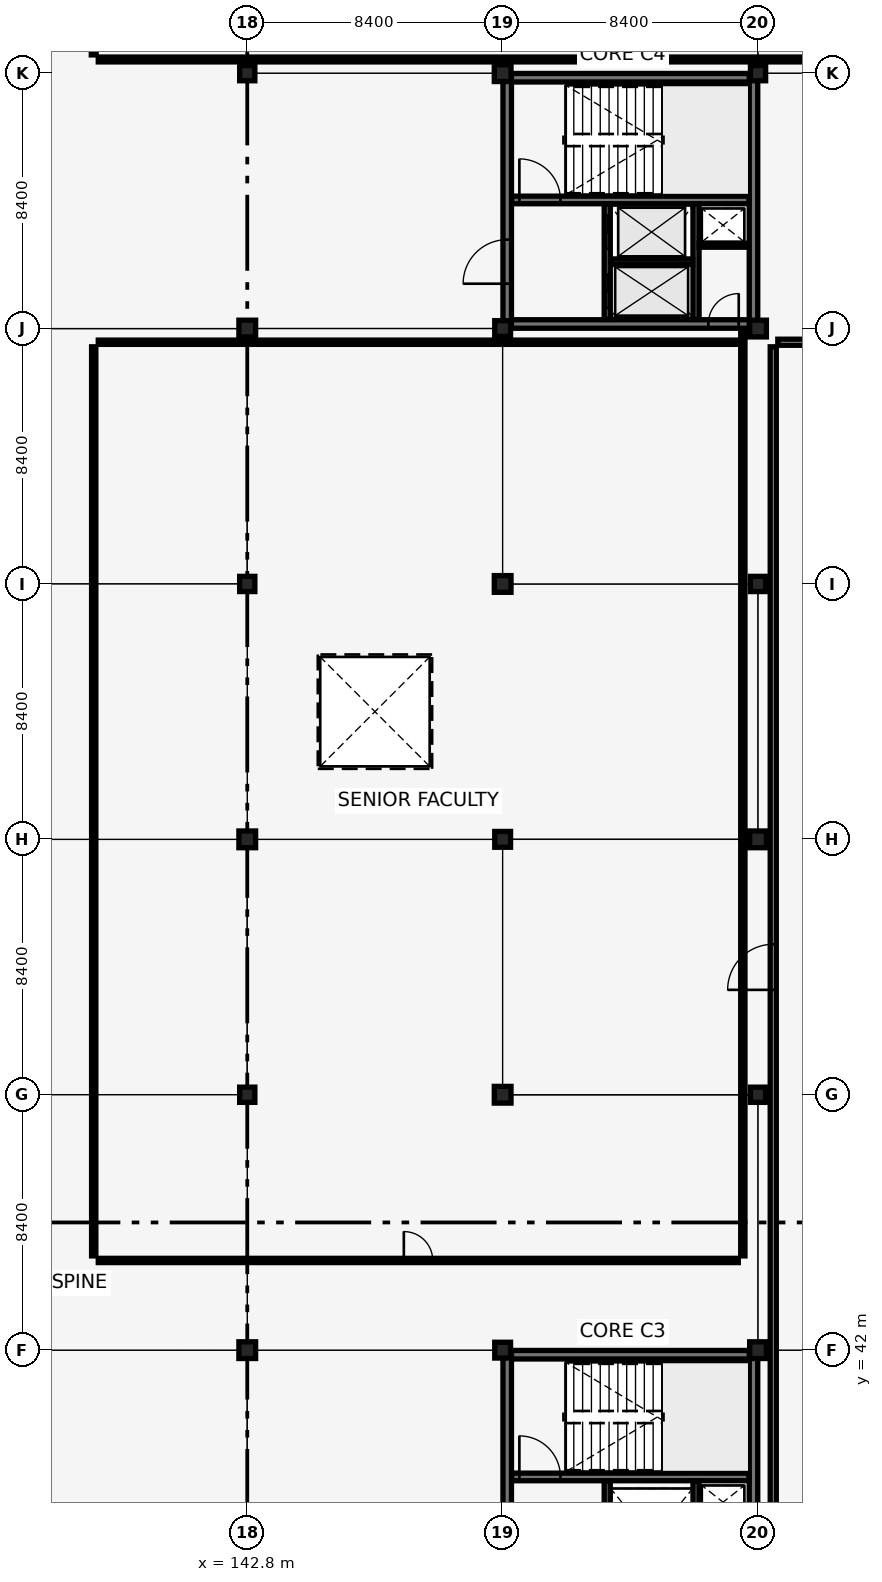
"""IFC4 building model, lengths in metres.
Left out: names, types, materials, properties, quantities, classifications, styles, units other than length and angle.
Written with IfcOpenShell. Run it as: python <this file> out.ifc"""

import sys

from ifc_helpers import new_model, si_unit, direction, frame, frame_2d, origin, origin_2d, place, context, subcontext, project, spatial, rectangle, extrude, element, fill, save


model = new_model("IFC4")
c1 = context("Model", 3, precision=1e-05, world=origin(), true_north=direction((0.0, 1.0)))
c2 = subcontext(c1, "Body", "Model", "MODEL_VIEW")
j1 = project(units=[si_unit("LENGTHUNIT", "METRE"), si_unit("PLANEANGLEUNIT", "RADIAN")], contexts=[c1])
p1 = place(None, origin())
s1 = spatial("IfcSite", under=j1, at=p1, CompositionType="ELEMENT")
p2 = place(p1, origin())
s2 = spatial("IfcBuilding", under=s1, at=p2, CompositionType="ELEMENT")
p3 = place(p2, frame((0.0, 0.0, 22.1)))
s3 = spatial("IfcBuildingStorey", under=s2, at=p3, CompositionType="ELEMENT", Elevation=22.1)
p4 = place(p3, frame((151.35, 41.85, 0.0), z_axis=(0.0, 0.0, 1.0), x_axis=(1.0, 0.0, 0.0)))
e1 = element("IfcWall", 1, at=p4, inside=s3, PredefinedType="SHEAR", context=c2, shape_type="SweptSolid", body=[
    extrude(rectangle(XDim=8.1, YDim=0.28, at=frame_2d((4.05, 0.0))), origin(), (0.0, 0.0, 1.0), 3.78),
])
p5 = place(p3, frame((151.35, 33.75, 0.0), z_axis=(0.0, 0.0, 1.0), x_axis=(0.0, 1.0, 0.0)))
e2 = element("IfcWall", 2, at=p5, inside=s3, PredefinedType="SHEAR", context=c2, shape_type="SweptSolid", body=[
    extrude(rectangle(XDim=8.1, YDim=0.28, at=frame_2d((4.05, 0.0))), origin(), (0.0, 0.0, 1.0), 3.78),
])
p6 = place(p5, frame((1.325, 0.0, 0.0)))
e3 = element("IfcOpeningElement", 3, at=p6, cuts=e2, PredefinedType="OPENING", context=c2, shape_type="SweptSolid", body=[
    extrude(rectangle(XDim=1.45, YDim=2.15, at=frame_2d((0.725, 1.075))), frame((0.0, 0.15, 0.0), z_axis=(0.0, -1.0, 0.0), x_axis=(1.0, 0.0, 0.0)), (0.0, 0.0, 1.0), 0.3),
])
p7 = place(p3, frame((159.45, 33.75, 0.0), z_axis=(0.0, 0.0, 1.0), x_axis=(0.0, 1.0, 0.0)))
e4 = element("IfcWall", 4, at=p7, inside=s3, PredefinedType="SHEAR", context=c2, shape_type="SweptSolid", body=[
    extrude(rectangle(XDim=8.1, YDim=0.28, at=frame_2d((4.05, 0.0))), origin(), (0.0, 0.0, 1.0), 3.78),
])
p8 = place(p3, frame((151.5, 37.83, 0.0), z_axis=(0.0, 0.0, 1.0), x_axis=(1.0, 0.0, 0.0)))
e5 = element("IfcWall", 5, at=p8, inside=s3, PredefinedType="SHEAR", context=c2, shape_type="SweptSolid", body=[
    extrude(rectangle(XDim=7.8, YDim=0.25, at=frame_2d((3.9, 0.0))), origin(), (0.0, 0.0, 1.0), 3.78),
])
p9 = place(p8, frame((0.25, 0.0, 0.0)))
e6 = element("IfcOpeningElement", 6, at=p9, cuts=e5, PredefinedType="OPENING", context=c2, shape_type="SweptSolid", body=[
    extrude(rectangle(XDim=1.35, YDim=2.15, at=frame_2d((0.675, 1.075))), frame((0.0, 0.135, 0.0), z_axis=(0.0, -1.0, 0.0), x_axis=(1.0, 0.0, 0.0)), (0.0, 0.0, 1.0), 0.27),
])
p10 = place(p3, frame((151.35, 75.75, 0.0), z_axis=(0.0, 0.0, 1.0), x_axis=(1.0, 0.0, 0.0)))
e7 = element("IfcWall", 7, at=p10, inside=s3, PredefinedType="SHEAR", context=c2, shape_type="SweptSolid", body=[
    extrude(rectangle(XDim=8.1, YDim=0.28, at=frame_2d((4.05, 0.0))), origin(), (0.0, 0.0, 1.0), 3.78),
])
p11 = place(p10, frame((6.615, 0.0, 0.0)))
e8 = element("IfcOpeningElement", 8, at=p11, cuts=e7, PredefinedType="OPENING", context=c2, shape_type="SweptSolid", body=[
    extrude(rectangle(XDim=1.0, YDim=2.15, at=frame_2d((0.5, 1.075))), frame((0.0, 0.15, 0.0), z_axis=(0.0, -1.0, 0.0), x_axis=(1.0, 0.0, 0.0)), (0.0, 0.0, 1.0), 0.3),
])
p12 = place(p3, frame((151.35, 83.85, 0.0), z_axis=(0.0, 0.0, 1.0), x_axis=(1.0, 0.0, 0.0)))
e9 = element("IfcWall", 9, at=p12, inside=s3, PredefinedType="SHEAR", context=c2, shape_type="SweptSolid", body=[
    extrude(rectangle(XDim=8.1, YDim=0.28, at=frame_2d((4.05, 0.0))), origin(), (0.0, 0.0, 1.0), 3.78),
])
p13 = place(p3, frame((151.35, 75.75, 0.0), z_axis=(0.0, 0.0, 1.0), x_axis=(0.0, 1.0, 0.0)))
e10 = element("IfcWall", 10, at=p13, inside=s3, PredefinedType="SHEAR", context=c2, shape_type="SweptSolid", body=[
    extrude(rectangle(XDim=8.1, YDim=0.28, at=frame_2d((4.05, 0.0))), origin(), (0.0, 0.0, 1.0), 3.78),
])
p14 = place(p13, frame((1.325, 0.0, 0.0)))
e11 = element("IfcOpeningElement", 11, at=p14, cuts=e10, PredefinedType="OPENING", context=c2, shape_type="SweptSolid", body=[
    extrude(rectangle(XDim=1.45, YDim=2.15, at=frame_2d((0.725, 1.075))), frame((0.0, 0.15, 0.0), z_axis=(0.0, -1.0, 0.0), x_axis=(1.0, 0.0, 0.0)), (0.0, 0.0, 1.0), 0.3),
])
p15 = place(p3, frame((159.45, 75.75, 0.0), z_axis=(0.0, 0.0, 1.0), x_axis=(0.0, 1.0, 0.0)))
e12 = element("IfcWall", 12, at=p15, inside=s3, PredefinedType="SHEAR", context=c2, shape_type="SweptSolid", body=[
    extrude(rectangle(XDim=8.1, YDim=0.28, at=frame_2d((4.05, 0.0))), origin(), (0.0, 0.0, 1.0), 3.78),
])
p16 = place(p3, frame((151.5, 79.83, 0.0), z_axis=(0.0, 0.0, 1.0), x_axis=(1.0, 0.0, 0.0)))
e13 = element("IfcWall", 13, at=p16, inside=s3, PredefinedType="SHEAR", context=c2, shape_type="SweptSolid", body=[
    extrude(rectangle(XDim=7.8, YDim=0.25, at=frame_2d((3.9, 0.0))), origin(), (0.0, 0.0, 1.0), 3.78),
])
p17 = place(p16, frame((0.25, 0.0, 0.0)))
e14 = element("IfcOpeningElement", 14, at=p17, cuts=e13, PredefinedType="OPENING", context=c2, shape_type="SweptSolid", body=[
    extrude(rectangle(XDim=1.35, YDim=2.15, at=frame_2d((0.675, 1.075))), frame((0.0, 0.135, 0.0), z_axis=(0.0, -1.0, 0.0), x_axis=(1.0, 0.0, 0.0)), (0.0, 0.0, 1.0), 0.27),
])
p18 = place(p3, frame((142.8, 42.0, 0.0), z_axis=(0.0, 0.0, 1.0), x_axis=(1.0, 0.0, 0.0)))
e15 = element("IfcColumn", 15, at=p18, inside=s3, PredefinedType="COLUMN", context=c2, shape_type="SweptSolid", body=[
    extrude(rectangle(XDim=0.55, YDim=0.55, at=origin_2d()), origin(), (0.0, 0.0, 1.0), 3.78),
])
p19 = place(p3, frame((142.8, 50.4, 0.0), z_axis=(0.0, 0.0, 1.0), x_axis=(1.0, 0.0, 0.0)))
e16 = element("IfcColumn", 16, at=p19, inside=s3, PredefinedType="COLUMN", context=c2, shape_type="SweptSolid", body=[
    extrude(rectangle(XDim=0.5, YDim=0.5, at=origin_2d()), origin(), (0.0, 0.0, 1.0), 3.78),
])
p20 = place(p3, frame((142.8, 58.8, 0.0), z_axis=(0.0, 0.0, 1.0), x_axis=(1.0, 0.0, 0.0)))
e17 = element("IfcColumn", 17, at=p20, inside=s3, PredefinedType="COLUMN", context=c2, shape_type="SweptSolid", body=[
    extrude(rectangle(XDim=0.55, YDim=0.55, at=origin_2d()), origin(), (0.0, 0.0, 1.0), 3.78),
])
p21 = place(p3, frame((142.8, 67.2, 0.0), z_axis=(0.0, 0.0, 1.0), x_axis=(1.0, 0.0, 0.0)))
e18 = element("IfcColumn", 18, at=p21, inside=s3, PredefinedType="COLUMN", context=c2, shape_type="SweptSolid", body=[
    extrude(rectangle(XDim=0.5, YDim=0.5, at=origin_2d()), origin(), (0.0, 0.0, 1.0), 3.78),
])
p22 = place(p3, frame((142.8, 75.6, 0.0), z_axis=(0.0, 0.0, 1.0), x_axis=(1.0, 0.0, 0.0)))
e19 = element("IfcColumn", 19, at=p22, inside=s3, PredefinedType="COLUMN", context=c2, shape_type="SweptSolid", body=[
    extrude(rectangle(XDim=0.55, YDim=0.55, at=origin_2d()), origin(), (0.0, 0.0, 1.0), 3.78),
])
p23 = place(p3, frame((142.8, 84.0, 0.0), z_axis=(0.0, 0.0, 1.0), x_axis=(1.0, 0.0, 0.0)))
e20 = element("IfcColumn", 20, at=p23, inside=s3, PredefinedType="COLUMN", context=c2, shape_type="SweptSolid", body=[
    extrude(rectangle(XDim=0.5, YDim=0.5, at=origin_2d()), origin(), (0.0, 0.0, 1.0), 3.78),
])
p24 = place(p3, frame((151.2, 42.0, 0.0), z_axis=(0.0, 0.0, 1.0), x_axis=(1.0, 0.0, 0.0)))
e21 = element("IfcColumn", 21, at=p24, inside=s3, PredefinedType="COLUMN", context=c2, shape_type="SweptSolid", body=[
    extrude(rectangle(XDim=0.52, YDim=0.52, at=origin_2d()), origin(), (0.0, 0.0, 1.0), 3.78),
])
p25 = place(p3, frame((151.2, 50.4, 0.0), z_axis=(0.0, 0.0, 1.0), x_axis=(1.0, 0.0, 0.0)))
e22 = element("IfcColumn", 22, at=p25, inside=s3, PredefinedType="COLUMN", context=c2, shape_type="SweptSolid", body=[
    extrude(rectangle(XDim=0.55, YDim=0.55, at=origin_2d()), origin(), (0.0, 0.0, 1.0), 3.78),
])
p26 = place(p3, frame((151.2, 58.8, 0.0), z_axis=(0.0, 0.0, 1.0), x_axis=(1.0, 0.0, 0.0)))
e23 = element("IfcColumn", 23, at=p26, inside=s3, PredefinedType="COLUMN", context=c2, shape_type="SweptSolid", body=[
    extrude(rectangle(XDim=0.52, YDim=0.52, at=origin_2d()), origin(), (0.0, 0.0, 1.0), 3.78),
])
p27 = place(p3, frame((151.2, 67.2, 0.0), z_axis=(0.0, 0.0, 1.0), x_axis=(1.0, 0.0, 0.0)))
e24 = element("IfcColumn", 24, at=p27, inside=s3, PredefinedType="COLUMN", context=c2, shape_type="SweptSolid", body=[
    extrude(rectangle(XDim=0.55, YDim=0.55, at=origin_2d()), origin(), (0.0, 0.0, 1.0), 3.78),
])
p28 = place(p3, frame((151.2, 75.6, 0.0), z_axis=(0.0, 0.0, 1.0), x_axis=(1.0, 0.0, 0.0)))
e25 = element("IfcColumn", 25, at=p28, inside=s3, PredefinedType="COLUMN", context=c2, shape_type="SweptSolid", body=[
    extrude(rectangle(XDim=0.52, YDim=0.52, at=origin_2d()), origin(), (0.0, 0.0, 1.0), 3.78),
])
for number, where, z_axis, x_axis in (
    (26, (151.2, 84.0, 0.0), (0.0, 0.0, 1.0), (1.0, 0.0, 0.0)),
    (27, (159.6, 42.0, 0.0), (0.0, 0.0, 1.0), (1.0, 0.0, 0.0)),
):
    element("IfcColumn", number, at=place(p3, frame(where, z_axis=z_axis, x_axis=x_axis)), inside=s3, PredefinedType="COLUMN", context=c2, shape_type="SweptSolid", body=[
        extrude(rectangle(XDim=0.55, YDim=0.55, at=origin_2d()), origin(), (0.0, 0.0, 1.0), 3.78),
    ])
p29 = place(p3, frame((159.6, 50.4, 0.0), z_axis=(0.0, 0.0, 1.0), x_axis=(1.0, 0.0, 0.0)))
e28 = element("IfcColumn", 28, at=p29, inside=s3, PredefinedType="COLUMN", context=c2, shape_type="SweptSolid", body=[
    extrude(rectangle(XDim=0.5, YDim=0.5, at=origin_2d()), origin(), (0.0, 0.0, 1.0), 3.78),
])
p30 = place(p3, frame((159.6, 58.8, 0.0), z_axis=(0.0, 0.0, 1.0), x_axis=(1.0, 0.0, 0.0)))
e29 = element("IfcColumn", 29, at=p30, inside=s3, PredefinedType="COLUMN", context=c2, shape_type="SweptSolid", body=[
    extrude(rectangle(XDim=0.55, YDim=0.55, at=origin_2d()), origin(), (0.0, 0.0, 1.0), 3.78),
])
p31 = place(p3, frame((159.6, 67.2, 0.0), z_axis=(0.0, 0.0, 1.0), x_axis=(1.0, 0.0, 0.0)))
e30 = element("IfcColumn", 30, at=p31, inside=s3, PredefinedType="COLUMN", context=c2, shape_type="SweptSolid", body=[
    extrude(rectangle(XDim=0.5, YDim=0.5, at=origin_2d()), origin(), (0.0, 0.0, 1.0), 3.78),
])
p32 = place(p3, frame((159.6, 75.6, 0.0), z_axis=(0.0, 0.0, 1.0), x_axis=(1.0, 0.0, 0.0)))
e31 = element("IfcColumn", 31, at=p32, inside=s3, PredefinedType="COLUMN", context=c2, shape_type="SweptSolid", body=[
    extrude(rectangle(XDim=0.55, YDim=0.55, at=origin_2d()), origin(), (0.0, 0.0, 1.0), 3.78),
])
p33 = place(p3, frame((159.6, 84.0, 0.0), z_axis=(0.0, 0.0, 1.0), x_axis=(1.0, 0.0, 0.0)))
e32 = element("IfcColumn", 32, at=p33, inside=s3, PredefinedType="COLUMN", context=c2, shape_type="SweptSolid", body=[
    extrude(rectangle(XDim=0.5, YDim=0.5, at=origin_2d()), origin(), (0.0, 0.0, 1.0), 3.78),
])
p34 = place(p3, frame((154.64, 33.9, 0.0), z_axis=(0.0, 0.0, 1.0), x_axis=(0.0, 1.0, 0.0)))
e33 = element("IfcWall", 33, at=p34, inside=s3, PredefinedType="SHEAR", context=c2, shape_type="SweptSolid", body=[
    extrude(rectangle(XDim=3.8, YDim=0.2, at=frame_2d((1.9, 0.0))), origin(), (0.0, 0.0, 1.0), 3.08),
])
p35 = place(p34, frame((1.35, 0.0, 0.0)))
e34 = element("IfcOpeningElement", 34, at=p35, cuts=e33, PredefinedType="OPENING", context=c2, shape_type="SweptSolid", body=[
    extrude(rectangle(XDim=1.1, YDim=2.15, at=frame_2d((0.55, 1.075))), frame((0.0, 0.11, 0.0), z_axis=(0.0, -1.0, 0.0), x_axis=(1.0, 0.0, 0.0)), (0.0, 0.0, 1.0), 0.22),
])
p36 = place(p3, frame((157.56, 33.9, 0.0), z_axis=(0.0, 0.0, 1.0), x_axis=(0.0, 1.0, 0.0)))
e35 = element("IfcWall", 35, at=p36, inside=s3, PredefinedType="SHEAR", context=c2, shape_type="SweptSolid", body=[
    extrude(rectangle(XDim=3.8, YDim=0.2, at=frame_2d((1.9, 0.0))), origin(), (0.0, 0.0, 1.0), 3.08),
])
p37 = place(p3, frame((154.64, 75.9, 0.0), z_axis=(0.0, 0.0, 1.0), x_axis=(0.0, 1.0, 0.0)))
e36 = element("IfcWall", 36, at=p37, inside=s3, PredefinedType="SHEAR", context=c2, shape_type="SweptSolid", body=[
    extrude(rectangle(XDim=3.8, YDim=0.2, at=frame_2d((1.9, 0.0))), origin(), (0.0, 0.0, 1.0), 3.78),
])
p38 = place(p37, frame((0.375, 0.0, 0.0)))
e37 = element("IfcOpeningElement", 37, at=p38, cuts=e36, PredefinedType="OPENING", context=c2, shape_type="SweptSolid", body=[
    extrude(rectangle(XDim=1.1, YDim=2.15, at=frame_2d((0.55, 1.075))), frame((0.0, 0.11, 0.0), z_axis=(0.0, -1.0, 0.0), x_axis=(1.0, 0.0, 0.0)), (0.0, 0.0, 1.0), 0.22),
])
p39 = place(p37, frame((2.325, 0.0, 0.0)))
e38 = element("IfcOpeningElement", 38, at=p39, cuts=e36, PredefinedType="OPENING", context=c2, shape_type="SweptSolid", body=[
    extrude(rectangle(XDim=1.1, YDim=2.15, at=frame_2d((0.55, 1.075))), frame((0.0, 0.11, 0.0), z_axis=(0.0, -1.0, 0.0), x_axis=(1.0, 0.0, 0.0)), (0.0, 0.0, 1.0), 0.22),
])
p40 = place(p3, frame((157.56, 75.9, 0.0), z_axis=(0.0, 0.0, 1.0), x_axis=(0.0, 1.0, 0.0)))
e39 = element("IfcWall", 39, at=p40, inside=s3, PredefinedType="SHEAR", context=c2, shape_type="SweptSolid", body=[
    extrude(rectangle(XDim=3.8, YDim=0.2, at=frame_2d((1.9, 0.0))), origin(), (0.0, 0.0, 1.0), 3.78),
])
p41 = place(p3, frame((154.75, 77.8, 0.0), z_axis=(0.0, 0.0, 1.0), x_axis=(1.0, 0.0, 0.0)))
e40 = element("IfcWall", 40, at=p41, inside=s3, PredefinedType="SHEAR", context=c2, shape_type="SweptSolid", body=[
    extrude(rectangle(XDim=2.7, YDim=0.18, at=frame_2d((1.35, 0.0))), origin(), (0.0, 0.0, 1.0), 3.78),
])
p42 = place(p3, frame((157.66, 78.34, 0.0), z_axis=(0.0, 0.0, 1.0), x_axis=(1.0, 0.0, 0.0)))
e41 = element("IfcWall", 41, at=p42, inside=s3, PredefinedType="PARTITIONING", context=c2, shape_type="SweptSolid", body=[
    extrude(rectangle(XDim=1.62, YDim=0.13, at=frame_2d((0.81, 0.0))), origin(), (0.0, 0.0, 1.0), 3.78),
])
p43 = place(p3, frame((160.1, 34.2, 0.0), z_axis=(0.0, 0.0, 1.0), x_axis=(0.0, 1.0, 0.0)))
e42 = element("IfcWall", 42, at=p43, inside=s3, PredefinedType="PARTITIONING", context=c2, shape_type="SweptSolid", body=[
    extrude(rectangle(XDim=40.8, YDim=0.2, at=frame_2d((20.4, 0.0))), origin(), (0.0, 0.0, 1.0), 3.78),
])
p44 = place(p43, frame((19.65, 0.0, 0.0)))
e43 = element("IfcOpeningElement", 43, at=p44, cuts=e42, PredefinedType="OPENING", context=c2, shape_type="SweptSolid", body=[
    extrude(rectangle(XDim=1.5, YDim=2.2, at=frame_2d((0.75, 1.1))), frame((0.0, 0.11, 0.0), z_axis=(0.0, -1.0, 0.0), x_axis=(1.0, 0.0, 0.0)), (0.0, 0.0, 1.0), 0.22),
])
p45 = place(p3, frame((160.25, 75.15, 0.0), z_axis=(0.0, 0.0, 1.0), x_axis=(1.0, 0.0, 0.0)))
e44 = element("IfcWall", 44, at=p45, inside=s3, PredefinedType="PARTITIONING", context=c2, shape_type="SweptSolid", body=[
    extrude(rectangle(XDim=7.57, YDim=0.2, at=frame_2d((3.785, 0.0))), origin(), (0.0, 0.0, 1.0), 3.78),
])
p46 = place(p3, frame((137.9, 44.95, 0.0), z_axis=(0.0, 0.0, 1.0), x_axis=(1.0, 0.0, 0.0)))
e45 = element("IfcWall", 45, at=p46, inside=s3, PredefinedType="PARTITIONING", context=c2, shape_type="SweptSolid", body=[
    extrude(rectangle(XDim=21.05, YDim=0.14, at=frame_2d((10.525, 0.0))), origin(), (0.0, 0.0, 1.0), 3.13),
])
p47 = place(p46, frame((10.05, 0.0, 0.0)))
e46 = element("IfcOpeningElement", 46, at=p47, cuts=e45, PredefinedType="OPENING", context=c2, shape_type="SweptSolid", body=[
    extrude(rectangle(XDim=0.95, YDim=2.1, at=frame_2d((0.475, 1.05))), frame((0.0, 0.08, 0.0), z_axis=(0.0, -1.0, 0.0), x_axis=(1.0, 0.0, 0.0)), (0.0, 0.0, 1.0), 0.16),
])
p48 = place(p3, frame((137.9, 75.15, 0.0), z_axis=(0.0, 0.0, 1.0), x_axis=(1.0, 0.0, 0.0)))
e47 = element("IfcWall", 47, at=p48, inside=s3, PredefinedType="PARTITIONING", context=c2, shape_type="SweptSolid", body=[
    extrude(rectangle(XDim=21.05, YDim=0.14, at=frame_2d((10.525, 0.0))), origin(), (0.0, 0.0, 1.0), 3.13),
])
p49 = place(p3, frame((137.75, 45.1, 0.0), z_axis=(0.0, 0.0, 1.0), x_axis=(0.0, 1.0, 0.0)))
e48 = element("IfcWall", 48, at=p49, inside=s3, PredefinedType="PARTITIONING", context=c2, shape_type="SweptSolid", body=[
    extrude(rectangle(XDim=29.9, YDim=0.14, at=frame_2d((14.95, 0.0))), origin(), (0.0, 0.0, 1.0), 3.08),
])
p50 = place(p3, frame((159.1, 45.1, 0.0), z_axis=(0.0, 0.0, 1.0), x_axis=(0.0, 1.0, 0.0)))
e49 = element("IfcWall", 49, at=p50, inside=s3, PredefinedType="PARTITIONING", context=c2, shape_type="SweptSolid", body=[
    extrude(rectangle(XDim=30.47, YDim=0.14, at=frame_2d((15.235, 0.0))), origin(), (0.0, 0.0, 1.0), 3.08),
])
p51 = place(p3, frame((137.75, 84.6, 0.0), z_axis=(0.0, 0.0, 1.0), x_axis=(0.0, 1.0, 0.0)))
e50 = element("IfcWall", 50, at=p51, inside=s3, PredefinedType="PARTITIONING", context=c2, shape_type="SweptSolid", body=[
    extrude(rectangle(XDim=16.02, YDim=0.16, at=frame_2d((8.01, 0.0))), origin(), (0.0, 0.0, 1.0), 3.16),
])
p52 = place(p51, frame((7.36, 0.0, 0.0)))
e51 = element("IfcOpeningElement", 51, at=p52, cuts=e50, PredefinedType="OPENING", context=c2, shape_type="SweptSolid", body=[
    extrude(rectangle(XDim=1.3, YDim=2.2, at=frame_2d((0.65, 1.1))), frame((0.0, 0.09, 0.0), z_axis=(0.0, -1.0, 0.0), x_axis=(1.0, 0.0, 0.0)), (0.0, 0.0, 1.0), 0.18),
])
p53 = place(p3, frame((137.9, 84.45, 0.0), z_axis=(0.0, 0.0, 1.0), x_axis=(1.0, 0.0, 0.0)))
e52 = element("IfcWall", 52, at=p53, inside=s3, PredefinedType="PARTITIONING", context=c2, shape_type="SweptSolid", body=[
    extrude(rectangle(XDim=29.82, YDim=0.16, at=frame_2d((14.91, 0.0))), origin(), (0.0, 0.0, 1.0), 3.13),
])
p54 = place(p9, origin())
e53 = element("IfcDoor", 53, at=p54, inside=s3, OperationType="SINGLE_SWING_LEFT", PredefinedType="DOOR", context=c2, shape_type="SweptSolid", body=[
    extrude(rectangle(XDim=1.35, YDim=2.15, at=frame_2d((0.675, 1.075))), frame((0.0, 0.025, 0.0), z_axis=(0.0, -1.0, 0.0), x_axis=(1.0, 0.0, 0.0)), (0.0, 0.0, 1.0), 0.05),
])
fill(e6, e53)
p55 = place(p17, origin())
e54 = element("IfcDoor", 54, at=p55, inside=s3, OperationType="SINGLE_SWING_LEFT", PredefinedType="DOOR", context=c2, shape_type="SweptSolid", body=[
    extrude(rectangle(XDim=1.35, YDim=2.15, at=frame_2d((0.675, 1.075))), frame((0.0, 0.025, 0.0), z_axis=(0.0, -1.0, 0.0), x_axis=(1.0, 0.0, 0.0)), (0.0, 0.0, 1.0), 0.05),
])
fill(e14, e54)
p56 = place(p38, origin())
e55 = element("IfcDoor", 55, at=p56, inside=s3, OperationType="SLIDING_TO_LEFT", PredefinedType="DOOR", context=c2, shape_type="SweptSolid", body=[
    extrude(rectangle(XDim=1.1, YDim=2.15, at=frame_2d((0.55, 1.075))), frame((0.0, 0.025, 0.0), z_axis=(0.0, -1.0, 0.0), x_axis=(1.0, 0.0, 0.0)), (0.0, 0.0, 1.0), 0.05),
])
fill(e37, e55)
p57 = place(p39, origin())
e56 = element("IfcDoor", 56, at=p57, inside=s3, OperationType="SLIDING_TO_LEFT", PredefinedType="DOOR", context=c2, shape_type="SweptSolid", body=[
    extrude(rectangle(XDim=1.1, YDim=2.15, at=frame_2d((0.55, 1.075))), frame((0.0, 0.025, 0.0), z_axis=(0.0, -1.0, 0.0), x_axis=(1.0, 0.0, 0.0)), (0.0, 0.0, 1.0), 0.05),
])
fill(e38, e56)
p58 = place(p14, origin())
e57 = element("IfcDoor", 57, at=p58, inside=s3, OperationType="DOUBLE_DOOR_SINGLE_SWING", PredefinedType="DOOR", context=c2, shape_type="SweptSolid", body=[
    extrude(rectangle(XDim=1.45, YDim=2.15, at=frame_2d((0.725, 1.075))), frame((0.0, 0.025, 0.0), z_axis=(0.0, -1.0, 0.0), x_axis=(1.0, 0.0, 0.0)), (0.0, 0.0, 1.0), 0.05),
])
fill(e11, e57)
p59 = place(p11, origin())
e58 = element("IfcDoor", 58, at=p59, inside=s3, OperationType="SINGLE_SWING_RIGHT", PredefinedType="DOOR", context=c2, shape_type="SweptSolid", body=[
    extrude(rectangle(XDim=1.0, YDim=2.15, at=frame_2d((0.5, 1.075))), frame((0.0, 0.025, 0.0), z_axis=(0.0, -1.0, 0.0), x_axis=(1.0, 0.0, 0.0)), (0.0, 0.0, 1.0), 0.05),
])
fill(e8, e58)
p60 = place(p44, origin())
e59 = element("IfcDoor", 59, at=p60, inside=s3, OperationType="DOUBLE_DOOR_SINGLE_SWING", PredefinedType="DOOR", context=c2, shape_type="SweptSolid", body=[
    extrude(rectangle(XDim=1.5, YDim=2.2, at=frame_2d((0.75, 1.1))), frame((0.0, 0.025, 0.0), z_axis=(0.0, -1.0, 0.0), x_axis=(1.0, 0.0, 0.0)), (0.0, 0.0, 1.0), 0.05),
])
fill(e43, e59)
p61 = place(p47, origin())
e60 = element("IfcDoor", 60, at=p61, inside=s3, OperationType="SINGLE_SWING_LEFT", PredefinedType="DOOR", context=c2, shape_type="SweptSolid", body=[
    extrude(rectangle(XDim=0.95, YDim=2.1, at=frame_2d((0.475, 1.05))), frame((0.0, 0.025, 0.0), z_axis=(0.0, -1.0, 0.0), x_axis=(1.0, 0.0, 0.0)), (0.0, 0.0, 1.0), 0.05),
])
fill(e46, e60)
save(model, sys.argv[1])
